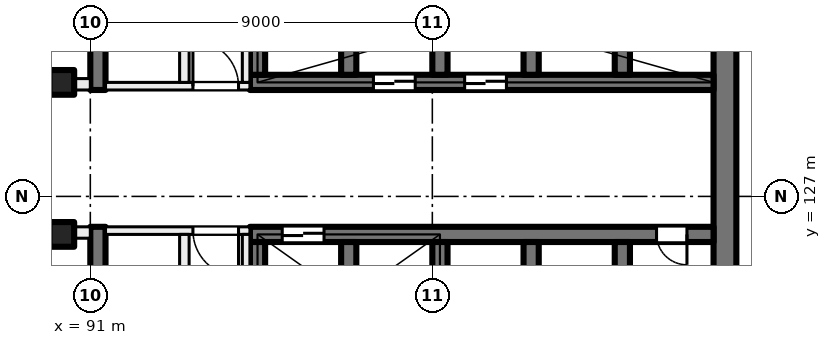
"""IFC4 building model, lengths in metres.
Left out: names, types, materials, properties, quantities, classifications, styles, units other than length and angle.
Written with IfcOpenShell. Run it as: python <this file> out.ifc"""

import sys

from ifc_helpers import new_model, si_unit, direction, frame, frame_2d, origin, origin_2d, place, context, subcontext, project, spatial, rectangle, extrude, element, fill, save


model = new_model("IFC4")
c1 = context("Model", 3, precision=1e-05, world=origin(), true_north=direction((0.0, 1.0)))
c2 = subcontext(c1, "Body", "Model", "MODEL_VIEW")
j1 = project(units=[si_unit("LENGTHUNIT", "METRE"), si_unit("PLANEANGLEUNIT", "RADIAN")], contexts=[c1])
p1 = place(None, origin())
s1 = spatial("IfcSite", under=j1, at=p1, CompositionType="ELEMENT")
p2 = place(p1, origin())
s2 = spatial("IfcBuilding", under=s1, at=p2, CompositionType="ELEMENT")
p3 = place(p2, frame((0.0, 0.0, 93.0)))
s3 = spatial("IfcBuildingStorey", under=s2, at=p3, CompositionType="ELEMENT", Elevation=93.0)
for number, where, z_axis, x_axis in (
    (1, (90.25, 130.0, 0.0), (0.0, 0.0, 1.0), (1.0, 0.0, 0.0)),
    (2, (90.25, 126.0, 0.0), (0.0, 0.0, 1.0), (1.0, 0.0, 0.0)),
):
    element("IfcColumn", number, at=place(p3, frame(where, z_axis=z_axis, x_axis=x_axis)), inside=s3, PredefinedType="COLUMN", context=c2, shape_type="SweptSolid", body=[
        extrude(rectangle(XDim=0.65, YDim=0.65, at=origin_2d()), origin(), (0.0, 0.0, 1.0), 4.0),
    ])
p4 = place(p3, frame((107.7, 135.2, 0.0), z_axis=(0.0, 0.0, 1.0), x_axis=(0.0, -1.0, 0.0)))
e3 = element("IfcWall", 3, at=p4, inside=s3, PredefinedType="SHEAR", context=c2, shape_type="SweptSolid", body=[
    extrude(rectangle(XDim=14.4, YDim=0.6, at=frame_2d((7.2, 0.0))), origin(), (0.0, 0.0, 1.0), 4.0),
])
p5 = place(p3, frame((107.4, 130.0, 0.0), z_axis=(0.0, 0.0, 1.0), x_axis=(-1.0, 0.0, 0.0)))
e4 = element("IfcWall", 4, at=p5, inside=s3, PredefinedType="SHEAR", context=c2, shape_type="SweptSolid", body=[
    extrude(rectangle(XDim=12.2, YDim=0.4, at=frame_2d((6.1, 0.0))), origin(), (0.0, 0.0, 1.0), 4.0),
])
p6 = place(p5, frame((5.45, 0.0, 0.0)))
e5 = element("IfcOpeningElement", 5, at=p6, cuts=e4, PredefinedType="OPENING", context=c2, shape_type="SweptSolid", body=[
    extrude(rectangle(XDim=1.1, YDim=2.1, at=frame_2d((0.55, 1.05))), frame((0.0, 0.21, 0.0), z_axis=(0.0, -1.0, 0.0), x_axis=(1.0, 0.0, 0.0)), (0.0, 0.0, 1.0), 0.42),
])
p7 = place(p5, frame((7.85, 0.0, 0.0)))
e6 = element("IfcOpeningElement", 6, at=p7, cuts=e4, PredefinedType="OPENING", context=c2, shape_type="SweptSolid", body=[
    extrude(rectangle(XDim=1.1, YDim=2.1, at=frame_2d((0.55, 1.05))), frame((0.0, 0.21, 0.0), z_axis=(0.0, -1.0, 0.0), x_axis=(1.0, 0.0, 0.0)), (0.0, 0.0, 1.0), 0.42),
])
for number, where, z_axis, x_axis in (
    (7, (105.0, 133.2, 0.0), (0.0, 0.0, 1.0), (0.0, -1.0, 0.0)),
    (8, (102.6, 133.2, 0.0), (0.0, 0.0, 1.0), (0.0, -1.0, 0.0)),
    (9, (100.2, 133.2, 0.0), (0.0, 0.0, 1.0), (0.0, -1.0, 0.0)),
    (10, (97.8, 133.2, 0.0), (0.0, 0.0, 1.0), (0.0, -1.0, 0.0)),
    (11, (95.4, 133.2, 0.0), (0.0, 0.0, 1.0), (0.0, -1.0, 0.0)),
):
    element("IfcWall", number, at=place(p3, frame(where, z_axis=z_axis, x_axis=x_axis)), inside=s3, PredefinedType="SHEAR", context=c2, shape_type="SweptSolid", body=[
        extrude(rectangle(XDim=3.0, YDim=0.4, at=frame_2d((1.5, 0.0))), origin(), (0.0, 0.0, 1.0), 4.0),
    ])
p8 = place(p3, frame((107.4, 126.0, 0.0), z_axis=(0.0, 0.0, 1.0), x_axis=(-1.0, 0.0, 0.0)))
e12 = element("IfcWall", 12, at=p8, inside=s3, PredefinedType="SHEAR", context=c2, shape_type="SweptSolid", body=[
    extrude(rectangle(XDim=12.2, YDim=0.4, at=frame_2d((6.1, 0.0))), origin(), (0.0, 0.0, 1.0), 4.0),
])
p9 = place(p8, frame((10.25, 0.0, 0.0)))
e13 = element("IfcOpeningElement", 13, at=p9, cuts=e12, PredefinedType="OPENING", context=c2, shape_type="SweptSolid", body=[
    extrude(rectangle(XDim=1.1, YDim=2.1, at=frame_2d((0.55, 1.05))), frame((0.0, 0.21, 0.0), z_axis=(0.0, -1.0, 0.0), x_axis=(1.0, 0.0, 0.0)), (0.0, 0.0, 1.0), 0.42),
])
p10 = place(p8, frame((0.7, 0.0, 0.0)))
e14 = element("IfcOpeningElement", 14, at=p10, cuts=e12, PredefinedType="OPENING", context=c2, shape_type="SweptSolid", body=[
    extrude(rectangle(XDim=0.8, YDim=2.1, at=frame_2d((0.4, 1.05))), frame((0.0, 0.21, 0.0), z_axis=(0.0, -1.0, 0.0), x_axis=(1.0, 0.0, 0.0)), (0.0, 0.0, 1.0), 0.42),
])
for number, where, z_axis, x_axis in (
    (15, (105.0, 125.8, 0.0), (0.0, 0.0, 1.0), (0.0, -1.0, 0.0)),
    (16, (102.6, 125.8, 0.0), (0.0, 0.0, 1.0), (0.0, -1.0, 0.0)),
    (17, (100.2, 125.8, 0.0), (0.0, 0.0, 1.0), (0.0, -1.0, 0.0)),
    (18, (97.8, 125.8, 0.0), (0.0, 0.0, 1.0), (0.0, -1.0, 0.0)),
    (19, (95.4, 125.8, 0.0), (0.0, 0.0, 1.0), (0.0, -1.0, 0.0)),
):
    element("IfcWall", number, at=place(p3, frame(where, z_axis=z_axis, x_axis=x_axis)), inside=s3, PredefinedType="SHEAR", context=c2, shape_type="SweptSolid", body=[
        extrude(rectangle(XDim=3.0, YDim=0.4, at=frame_2d((1.5, 0.0))), origin(), (0.0, 0.0, 1.0), 4.0),
    ])
for number, where, z_axis, x_axis in (
    (20, (91.2, 138.4, 0.0), (0.0, 0.0, 1.0), (0.0, -1.0, 0.0)),
    (21, (91.2, 126.2, 0.0), (0.0, 0.0, 1.0), (0.0, -1.0, 0.0)),
):
    element("IfcWall", number, at=place(p3, frame(where, z_axis=z_axis, x_axis=x_axis)), inside=s3, PredefinedType="SHEAR", context=c2, shape_type="SweptSolid", body=[
        extrude(rectangle(XDim=8.6, YDim=0.4, at=frame_2d((4.3, 0.0))), origin(), (0.0, 0.0, 1.0), 4.0),
    ])
p11 = place(p3, frame((95.2, 126.1, 0.0), z_axis=(0.0, 0.0, 1.0), x_axis=(-1.0, 0.0, 0.0)))
e22 = element("IfcWall", 22, at=p11, inside=s3, PredefinedType="PARTITIONING", context=c2, shape_type="SweptSolid", body=[
    extrude(rectangle(XDim=3.8, YDim=0.2, at=frame_2d((1.9, 0.0))), origin(), (0.0, 0.0, 1.0), 3.625),
])
p12 = place(p11, frame((0.3, 0.0, 0.0)))
e23 = element("IfcOpeningElement", 23, at=p12, cuts=e22, PredefinedType="OPENING", context=c2, shape_type="SweptSolid", body=[
    extrude(rectangle(XDim=1.2, YDim=2.1, at=frame_2d((0.6, 1.05))), frame((0.0, 0.11, 0.0), z_axis=(0.0, -1.0, 0.0), x_axis=(1.0, 0.0, 0.0)), (0.0, 0.0, 1.0), 0.22),
])
p13 = place(p3, frame((95.1, 117.6, 0.0), z_axis=(0.0, 0.0, 1.0), x_axis=(0.0, 1.0, 0.0)))
e24 = element("IfcWall", 24, at=p13, inside=s3, PredefinedType="PARTITIONING", context=c2, shape_type="SweptSolid", body=[
    extrude(rectangle(XDim=8.4, YDim=0.2, at=frame_2d((4.2, 0.0))), origin(), (0.0, 0.0, 1.0), 3.625),
])
p14 = place(p13, frame((1.65, 0.0, 0.0)))
e25 = element("IfcOpeningElement", 25, at=p14, cuts=e24, PredefinedType="OPENING", context=c2, shape_type="SweptSolid", body=[
    extrude(rectangle(XDim=1.5, YDim=2.1, at=frame_2d((0.75, 1.05))), frame((0.0, 0.11, 0.0), z_axis=(0.0, -1.0, 0.0), x_axis=(1.0, 0.0, 0.0)), (0.0, 0.0, 1.0), 0.22),
])
p15 = place(p3, frame((93.475, 117.6, 0.0), z_axis=(0.0, 0.0, 1.0), x_axis=(0.0, 1.0, 0.0)))
e26 = element("IfcWall", 26, at=p15, inside=s3, PredefinedType="PARTITIONING", context=c2, shape_type="SweptSolid", body=[
    extrude(rectangle(XDim=8.4, YDim=0.25, at=frame_2d((4.2, 0.0))), origin(), (0.0, 0.0, 1.0), 3.625),
])
p16 = place(p15, frame((5.925, 0.0, 0.0)))
e27 = element("IfcOpeningElement", 27, at=p16, cuts=e26, PredefinedType="OPENING", context=c2, shape_type="SweptSolid", body=[
    extrude(rectangle(XDim=0.8, YDim=2.1, at=frame_2d((0.4, 1.05))), frame((0.0, 0.135, 0.0), z_axis=(0.0, -1.0, 0.0), x_axis=(1.0, 0.0, 0.0)), (0.0, 0.0, 1.0), 0.27),
])
p17 = place(p15, frame((1.675, 0.0, 0.0)))
e28 = element("IfcOpeningElement", 28, at=p17, cuts=e26, PredefinedType="OPENING", context=c2, shape_type="SweptSolid", body=[
    extrude(rectangle(XDim=0.8, YDim=2.1, at=frame_2d((0.4, 1.05))), frame((0.0, 0.135, 0.0), z_axis=(0.0, -1.0, 0.0), x_axis=(1.0, 0.0, 0.0)), (0.0, 0.0, 1.0), 0.27),
])
p18 = place(p3, frame((91.4, 129.9, 0.0), z_axis=(0.0, 0.0, 1.0), x_axis=(1.0, 0.0, 0.0)))
e29 = element("IfcWall", 29, at=p18, inside=s3, PredefinedType="PARTITIONING", context=c2, shape_type="SweptSolid", body=[
    extrude(rectangle(XDim=3.8, YDim=0.2, at=frame_2d((1.9, 0.0))), origin(), (0.0, 0.0, 1.0), 3.625),
])
p19 = place(p18, frame((2.3, 0.0, 0.0)))
e30 = element("IfcOpeningElement", 30, at=p19, cuts=e29, PredefinedType="OPENING", context=c2, shape_type="SweptSolid", body=[
    extrude(rectangle(XDim=1.2, YDim=2.1, at=frame_2d((0.6, 1.05))), frame((0.0, 0.11, 0.0), z_axis=(0.0, -1.0, 0.0), x_axis=(1.0, 0.0, 0.0)), (0.0, 0.0, 1.0), 0.22),
])
p20 = place(p3, frame((95.1, 130.0, 0.0), z_axis=(0.0, 0.0, 1.0), x_axis=(0.0, 1.0, 0.0)))
e31 = element("IfcWall", 31, at=p20, inside=s3, PredefinedType="PARTITIONING", context=c2, shape_type="SweptSolid", body=[
    extrude(rectangle(XDim=8.4, YDim=0.2, at=frame_2d((4.2, 0.0))), origin(), (0.0, 0.0, 1.0), 3.625),
])
p21 = place(p20, frame((5.25, 0.0, 0.0)))
e32 = element("IfcOpeningElement", 32, at=p21, cuts=e31, PredefinedType="OPENING", context=c2, shape_type="SweptSolid", body=[
    extrude(rectangle(XDim=1.5, YDim=2.1, at=frame_2d((0.75, 1.05))), frame((0.0, 0.11, 0.0), z_axis=(0.0, -1.0, 0.0), x_axis=(1.0, 0.0, 0.0)), (0.0, 0.0, 1.0), 0.22),
])
p22 = place(p3, frame((93.475, 130.0, 0.0), z_axis=(0.0, 0.0, 1.0), x_axis=(0.0, 1.0, 0.0)))
e33 = element("IfcWall", 33, at=p22, inside=s3, PredefinedType="PARTITIONING", context=c2, shape_type="SweptSolid", body=[
    extrude(rectangle(XDim=8.4, YDim=0.25, at=frame_2d((4.2, 0.0))), origin(), (0.0, 0.0, 1.0), 3.625),
])
p23 = place(p22, frame((1.575, 0.0, 0.0)))
e34 = element("IfcOpeningElement", 34, at=p23, cuts=e33, PredefinedType="OPENING", context=c2, shape_type="SweptSolid", body=[
    extrude(rectangle(XDim=1.0, YDim=2.1, at=frame_2d((0.5, 1.05))), frame((0.0, 0.135, 0.0), z_axis=(0.0, -1.0, 0.0), x_axis=(1.0, 0.0, 0.0)), (0.0, 0.0, 1.0), 0.27),
])
p24 = place(p22, frame((5.825, 0.0, 0.0)))
e35 = element("IfcOpeningElement", 35, at=p24, cuts=e33, PredefinedType="OPENING", context=c2, shape_type="SweptSolid", body=[
    extrude(rectangle(XDim=1.0, YDim=2.1, at=frame_2d((0.5, 1.05))), frame((0.0, 0.135, 0.0), z_axis=(0.0, -1.0, 0.0), x_axis=(1.0, 0.0, 0.0)), (0.0, 0.0, 1.0), 0.27),
])
p25 = place(p3, frame((72.5, 129.95, 0.0), z_axis=(0.0, 0.0, 1.0), x_axis=(1.0, 0.0, 0.0)))
e36 = element("IfcWall", 36, at=p25, inside=s3, PredefinedType="PARTITIONING", context=c2, shape_type="SweptSolid", body=[
    extrude(rectangle(XDim=18.5, YDim=0.3, at=frame_2d((9.25, 0.0))), origin(), (0.0, 0.0, 1.0), 3.625),
])
p26 = place(p25, frame((15.275, 0.0, 0.0)))
e37 = element("IfcOpeningElement", 37, at=p26, cuts=e36, PredefinedType="OPENING", context=c2, shape_type="SweptSolid", body=[
    extrude(rectangle(XDim=1.2, YDim=2.1, at=frame_2d((0.6, 1.05))), frame((0.0, 0.16, 0.0), z_axis=(0.0, -1.0, 0.0), x_axis=(1.0, 0.0, 0.0)), (0.0, 0.0, 1.0), 0.32),
])
p27 = place(p25, frame((10.4, 0.0, 0.0)))
e38 = element("IfcOpeningElement", 38, at=p27, cuts=e36, PredefinedType="OPENING", context=c2, shape_type="SweptSolid", body=[
    extrude(rectangle(XDim=1.2, YDim=2.1, at=frame_2d((0.6, 1.05))), frame((0.0, 0.16, 0.0), z_axis=(0.0, -1.0, 0.0), x_axis=(1.0, 0.0, 0.0)), (0.0, 0.0, 1.0), 0.32),
])
p28 = place(p25, frame((3.475, 0.0, 0.0)))
e39 = element("IfcOpeningElement", 39, at=p28, cuts=e36, PredefinedType="OPENING", context=c2, shape_type="SweptSolid", body=[
    extrude(rectangle(XDim=1.8, YDim=2.1, at=frame_2d((0.9, 1.05))), frame((0.0, 0.16, 0.0), z_axis=(0.0, -1.0, 0.0), x_axis=(1.0, 0.0, 0.0)), (0.0, 0.0, 1.0), 0.32),
])
p29 = place(p3, frame((91.0, 126.05, 0.0), z_axis=(0.0, 0.0, 1.0), x_axis=(-1.0, 0.0, 0.0)))
e40 = element("IfcWall", 40, at=p29, inside=s3, PredefinedType="PARTITIONING", context=c2, shape_type="SweptSolid", body=[
    extrude(rectangle(XDim=43.785, YDim=0.3, at=frame_2d((21.893, 0.0))), origin(), (0.0, 0.0, 1.0), 3.625),
])
p30 = place(p29, frame((7.85, 0.0, 0.0)))
e41 = element("IfcOpeningElement", 41, at=p30, cuts=e40, PredefinedType="OPENING", context=c2, shape_type="SweptSolid", body=[
    extrude(rectangle(XDim=0.8, YDim=2.1, at=frame_2d((0.4, 1.05))), frame((0.0, 0.16, 0.0), z_axis=(0.0, -1.0, 0.0), x_axis=(1.0, 0.0, 0.0)), (0.0, 0.0, 1.0), 0.32),
])
p31 = place(p29, frame((2.875, 0.0, 0.0)))
e42 = element("IfcOpeningElement", 42, at=p31, cuts=e40, PredefinedType="OPENING", context=c2, shape_type="SweptSolid", body=[
    extrude(rectangle(XDim=1.0, YDim=2.1, at=frame_2d((0.5, 1.05))), frame((0.0, 0.16, 0.0), z_axis=(0.0, -1.0, 0.0), x_axis=(1.0, 0.0, 0.0)), (0.0, 0.0, 1.0), 0.32),
])
p32 = place(p29, frame((15.6, 0.0, 0.0)))
e43 = element("IfcOpeningElement", 43, at=p32, cuts=e40, PredefinedType="OPENING", context=c2, shape_type="SweptSolid", body=[
    extrude(rectangle(XDim=1.8, YDim=2.1, at=frame_2d((0.9, 1.05))), frame((0.0, 0.16, 0.0), z_axis=(0.0, -1.0, 0.0), x_axis=(1.0, 0.0, 0.0)), (0.0, 0.0, 1.0), 0.32),
])
p33 = place(p29, frame((25.0, 0.0, 0.0)))
e44 = element("IfcOpeningElement", 44, at=p33, cuts=e40, PredefinedType="OPENING", context=c2, shape_type="SweptSolid", body=[
    extrude(rectangle(XDim=1.0, YDim=2.1, at=frame_2d((0.5, 1.05))), frame((0.0, 0.16, 0.0), z_axis=(0.0, -1.0, 0.0), x_axis=(1.0, 0.0, 0.0)), (0.0, 0.0, 1.0), 0.32),
])
p34 = place(p29, frame((39.296, 0.0, 0.0)))
e45 = element("IfcOpeningElement", 45, at=p34, cuts=e40, PredefinedType="OPENING", context=c2, shape_type="SweptSolid", body=[
    extrude(rectangle(XDim=1.8, YDim=2.1, at=frame_2d((0.9, 1.05))), frame((0.0, 0.16, 0.0), z_axis=(0.0, -1.0, 0.0), x_axis=(1.0, 0.0, 0.0)), (0.0, 0.0, 1.0), 0.32),
])
p35 = place(p9, origin())
e46 = element("IfcDoor", 46, at=p35, inside=s3, OperationType="DOUBLE_DOOR_SLIDING", PredefinedType="DOOR", context=c2, shape_type="SweptSolid", body=[
    extrude(rectangle(XDim=1.1, YDim=2.1, at=frame_2d((0.55, 1.05))), frame((0.0, 0.025, 0.0), z_axis=(0.0, -1.0, 0.0), x_axis=(1.0, 0.0, 0.0)), (0.0, 0.0, 1.0), 0.05),
])
fill(e13, e46)
p36 = place(p6, origin())
e47 = element("IfcDoor", 47, at=p36, inside=s3, OperationType="DOUBLE_DOOR_SLIDING", PredefinedType="DOOR", context=c2, shape_type="SweptSolid", body=[
    extrude(rectangle(XDim=1.1, YDim=2.1, at=frame_2d((0.55, 1.05))), frame((0.0, 0.025, 0.0), z_axis=(0.0, -1.0, 0.0), x_axis=(1.0, 0.0, 0.0)), (0.0, 0.0, 1.0), 0.05),
])
fill(e5, e47)
p37 = place(p7, origin())
e48 = element("IfcDoor", 48, at=p37, inside=s3, OperationType="DOUBLE_DOOR_SLIDING", PredefinedType="DOOR", context=c2, shape_type="SweptSolid", body=[
    extrude(rectangle(XDim=1.1, YDim=2.1, at=frame_2d((0.55, 1.05))), frame((0.0, 0.025, 0.0), z_axis=(0.0, -1.0, 0.0), x_axis=(1.0, 0.0, 0.0)), (0.0, 0.0, 1.0), 0.05),
])
fill(e6, e48)
p38 = place(p10, origin())
e49 = element("IfcDoor", 49, at=p38, inside=s3, OperationType="SINGLE_SWING_LEFT", PredefinedType="DOOR", context=c2, shape_type="SweptSolid", body=[
    extrude(rectangle(XDim=0.8, YDim=2.1, at=frame_2d((0.4, 1.05))), frame((0.0, 0.025, 0.0), z_axis=(0.0, -1.0, 0.0), x_axis=(1.0, 0.0, 0.0)), (0.0, 0.0, 1.0), 0.05),
])
fill(e14, e49)
p39 = place(p12, origin())
e50 = element("IfcDoor", 50, at=p39, inside=s3, OperationType="DOUBLE_DOOR_SINGLE_SWING", PredefinedType="DOOR", context=c2, shape_type="SweptSolid", body=[
    extrude(rectangle(XDim=1.2, YDim=2.1, at=frame_2d((0.6, 1.05))), frame((0.0, 0.025, 0.0), z_axis=(0.0, -1.0, 0.0), x_axis=(1.0, 0.0, 0.0)), (0.0, 0.0, 1.0), 0.05),
])
fill(e23, e50)
p40 = place(p19, origin())
e51 = element("IfcDoor", 51, at=p40, inside=s3, OperationType="DOUBLE_DOOR_SINGLE_SWING", PredefinedType="DOOR", context=c2, shape_type="SweptSolid", body=[
    extrude(rectangle(XDim=1.2, YDim=2.1, at=frame_2d((0.6, 1.05))), frame((0.0, 0.025, 0.0), z_axis=(0.0, -1.0, 0.0), x_axis=(1.0, 0.0, 0.0)), (0.0, 0.0, 1.0), 0.05),
])
fill(e30, e51)
save(model, sys.argv[1])
